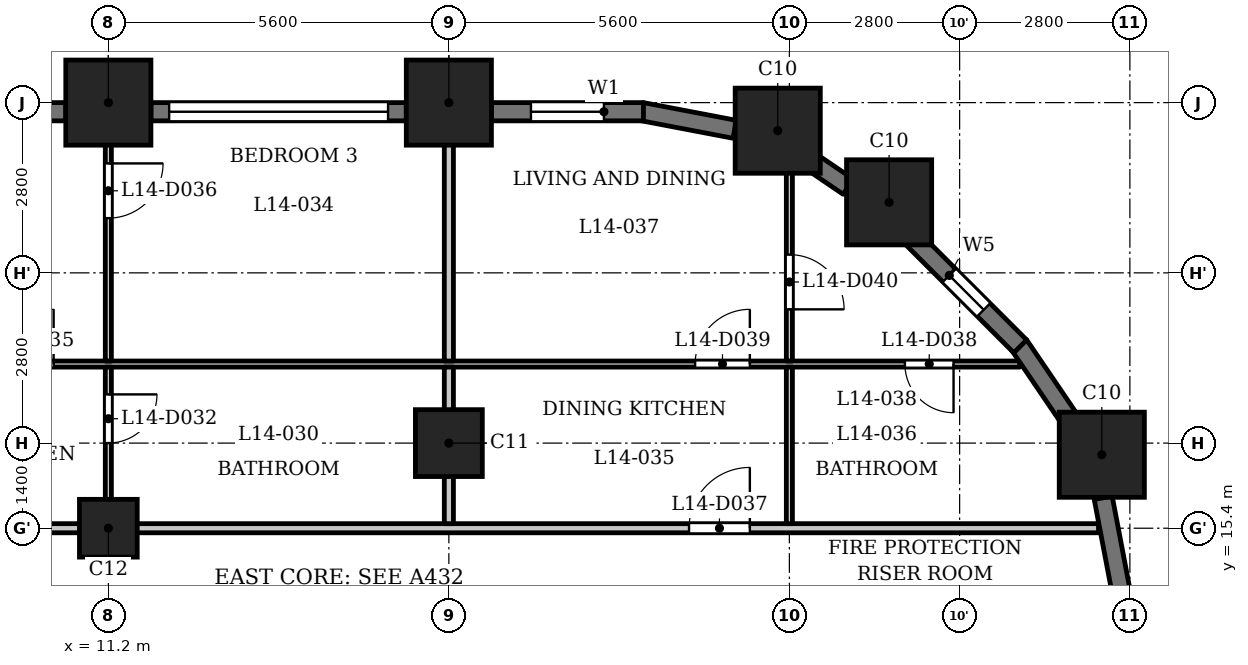
"""IFC4 building model, lengths in metres.
Left out: names, types, materials, properties, quantities, classifications, styles, units other than length and angle.
Written with IfcOpenShell. Run it as: python <this file> out.ifc"""

import sys

from ifc_helpers import new_model, si_unit, direction, frame, frame_2d, origin, origin_2d, place, context, subcontext, project, spatial, rectangle, extrude, element, fill, save


model = new_model("IFC4")
c1 = context("Model", 3, precision=1e-05, world=origin(), true_north=direction((0.0, 1.0)))
c2 = subcontext(c1, "Body", "Model", "MODEL_VIEW")
j1 = project(units=[si_unit("LENGTHUNIT", "METRE"), si_unit("PLANEANGLEUNIT", "RADIAN")], contexts=[c1])
p1 = place(None, origin())
s1 = spatial("IfcSite", under=j1, at=p1, CompositionType="ELEMENT")
p2 = place(p1, origin())
s2 = spatial("IfcBuilding", under=s1, at=p2, CompositionType="ELEMENT")
p3 = place(p2, frame((0.0, 0.0, 58.5)))
s3 = spatial("IfcBuildingStorey", under=s2, at=p3, CompositionType="ELEMENT", Elevation=58.5)
for number, where, z_axis, x_axis in (
    (1, (27.538, 16.609, 0.0), (0.0, 0.0, 1.0), (1.0, 0.0, 0.0)),
    (2, (24.04, 20.76, 0.0), (0.0, 0.0, 1.0), (1.0, 0.0, 0.0)),
    (3, (22.209, 21.938, 0.0), (0.0, 0.0, 1.0), (1.0, 0.0, 0.0)),
    (4, (16.8, 22.4, 0.0), (0.0, 0.0, 1.0), (1.0, 0.0, 0.0)),
    (5, (11.2, 22.4, 0.0), (0.0, 0.0, 1.0), (1.0, 0.0, 0.0)),
):
    element("IfcColumn", number, at=place(p3, frame(where, z_axis=z_axis, x_axis=x_axis)), inside=s3, PredefinedType="COLUMN", context=c2, shape_type="SweptSolid", body=[
        extrude(rectangle(XDim=1.4, YDim=1.4, at=origin_2d()), origin(), (0.0, 0.0, 1.0), 3.5),
    ])
p4 = place(p3, frame((16.8, 16.8, 0.0), z_axis=(0.0, 0.0, 1.0), x_axis=(1.0, 0.0, 0.0)))
e6 = element("IfcColumn", 6, at=p4, inside=s3, PredefinedType="COLUMN", context=c2, shape_type="SweptSolid", body=[
    extrude(rectangle(XDim=1.1, YDim=1.1, at=origin_2d()), origin(), (0.0, 0.0, 1.0), 3.5),
])
p5 = place(p3, frame((11.2, 15.4, 0.0), z_axis=(0.0, 0.0, 1.0), x_axis=(1.0, 0.0, 0.0)))
e7 = element("IfcColumn", 7, at=p5, inside=s3, PredefinedType="COLUMN", context=c2, shape_type="SweptSolid", body=[
    extrude(rectangle(XDim=0.95, YDim=0.95, at=origin_2d()), origin(), (0.0, 0.0, 1.0), 3.5),
])
for number, where, z_axis, x_axis in (
    (8, (27.853, 14.372, 0.0), (0.0, 0.0, 1.0), (-0.187, 0.982, 0.0)),
    (9, (27.053, 17.126, 0.0), (0.0, 0.0, 1.0), (-0.562, 0.827, 0.0)),
):
    element("IfcWall", number, at=place(p3, frame(where, z_axis=z_axis, x_axis=x_axis)), inside=s3, PredefinedType="SOLIDWALL", context=c2, shape_type="SweptSolid", body=[
        extrude(rectangle(XDim=1.556, YDim=0.3, at=frame_2d((0.778, 0.0))), origin(), (0.0, 0.0, 1.0), 2.35),
    ])
p6 = place(p3, frame((26.197, 18.391, 0.0), z_axis=(0.0, 0.0, 1.0), x_axis=(-0.707057949532, 0.707155609469, 0.0)))
e10 = element("IfcWall", 10, at=p6, inside=s3, PredefinedType="SOLIDWALL", context=c2, shape_type="SweptSolid", body=[
    extrude(rectangle(XDim=2.5, YDim=0.3, at=frame_2d((1.25, 0.0))), origin(), (0.0, 0.0, 1.0), 2.35),
])
p7 = place(p6, frame((0.85, 0.0, 0.6)))
e11 = element("IfcOpeningElement", 11, at=p7, cuts=e10, PredefinedType="OPENING", context=c2, shape_type="SweptSolid", body=[
    extrude(rectangle(XDim=0.8, YDim=1.55, at=frame_2d((0.4, 0.775))), frame((0.0, 0.16, 0.0), z_axis=(0.0, -1.0, 0.0), x_axis=(1.0, 0.0, 0.0)), (0.0, 0.0, 1.0), 0.32),
])
p8 = place(p3, frame((23.368, 21.017, 0.0), z_axis=(0.0, 0.0, 1.0), x_axis=(-0.827037530089, 0.562146710232, 0.0)))
e12 = element("IfcWall", 12, at=p8, inside=s3, PredefinedType="SOLIDWALL", context=c2, shape_type="SweptSolid", body=[
    extrude(rectangle(XDim=0.777, YDim=0.3, at=frame_2d((0.388, 0.0))), origin(), (0.0, 0.0, 1.0), 3.2),
])
p9 = place(p3, frame((21.5, 21.961, 0.0), z_axis=(0.0, 0.0, 1.0), x_axis=(-0.982297345734, 0.187328386968, 0.0)))
e13 = element("IfcWall", 13, at=p9, inside=s3, PredefinedType="SOLIDWALL", context=c2, shape_type="SweptSolid", body=[
    extrude(rectangle(XDim=1.556, YDim=0.3, at=frame_2d((0.778, 0.0))), origin(), (0.0, 0.0, 1.0), 2.35),
])
p10 = place(p3, frame((20.0, 22.25, 0.0), z_axis=(0.0, 0.0, 1.0), x_axis=(-1.0, 0.0, 0.0)))
e14 = element("IfcWall", 14, at=p10, inside=s3, PredefinedType="SOLIDWALL", context=c2, shape_type="SweptSolid", body=[
    extrude(rectangle(XDim=2.5, YDim=0.3, at=frame_2d((1.25, 0.0))), origin(), (0.0, 0.0, 1.0), 2.35),
])
p11 = place(p10, frame((0.65, 0.0, 0.6)))
e15 = element("IfcOpeningElement", 15, at=p11, cuts=e14, PredefinedType="OPENING", context=c2, shape_type="SweptSolid", body=[
    extrude(rectangle(XDim=1.2, YDim=1.55, at=frame_2d((0.6, 0.775))), frame((0.0, 0.16, 0.0), z_axis=(0.0, -1.0, 0.0), x_axis=(1.0, 0.0, 0.0)), (0.0, 0.0, 1.0), 0.32),
])
p12 = place(p3, frame((16.1, 22.25, 0.0), z_axis=(0.0, 0.0, 1.0), x_axis=(-1.0, 0.0, 0.0)))
e16 = element("IfcWall", 16, at=p12, inside=s3, PredefinedType="SOLIDWALL", context=c2, shape_type="SweptSolid", body=[
    extrude(rectangle(XDim=4.2, YDim=0.3, at=frame_2d((2.1, 0.0))), origin(), (0.0, 0.0, 1.0), 2.35),
])
p13 = place(p12, frame((0.3, 0.0, 1.2)))
e17 = element("IfcOpeningElement", 17, at=p13, cuts=e16, PredefinedType="OPENING", context=c2, shape_type="SweptSolid", body=[
    extrude(rectangle(XDim=3.6, YDim=0.95, at=frame_2d((1.8, 0.475))), frame((0.0, 0.16, 0.0), z_axis=(0.0, -1.0, 0.0), x_axis=(1.0, 0.0, 0.0)), (0.0, 0.0, 1.0), 0.32),
])
p14 = place(p3, frame((10.5, 22.25, 0.0), z_axis=(0.0, 0.0, 1.0), x_axis=(-1.0, 0.0, 0.0)))
e18 = element("IfcWall", 18, at=p14, inside=s3, PredefinedType="SOLIDWALL", context=c2, shape_type="SweptSolid", body=[
    extrude(rectangle(XDim=4.2, YDim=0.3, at=frame_2d((2.1, 0.0))), origin(), (0.0, 0.0, 1.0), 2.35),
])
p15 = place(p14, frame((0.3, 0.0, 1.2)))
e19 = element("IfcOpeningElement", 19, at=p15, cuts=e18, PredefinedType="OPENING", context=c2, shape_type="SweptSolid", body=[
    extrude(rectangle(XDim=3.6, YDim=0.95, at=frame_2d((1.8, 0.475))), frame((0.0, 0.16, 0.0), z_axis=(0.0, -1.0, 0.0), x_axis=(1.0, 0.0, 0.0)), (0.0, 0.0, 1.0), 0.32),
])
p16 = place(p3, frame((-27.484, 15.4, 0.0), z_axis=(0.0, 0.0, 1.0), x_axis=(1.0, 0.0, 0.0)))
e20 = element("IfcWall", 20, at=p16, inside=s3, PredefinedType="PARTITIONING", context=c2, shape_type="SweptSolid", body=[
    extrude(rectangle(XDim=54.968, YDim=0.15, at=frame_2d((27.484, 0.0))), origin(), (0.0, 0.0, 1.0), 3.2),
])
p17 = place(p16, frame((8.784, 0.0, 0.0)))
e21 = element("IfcOpeningElement", 21, at=p17, cuts=e20, PredefinedType="OPENING", context=c2, shape_type="SweptSolid", body=[
    extrude(rectangle(XDim=1.0, YDim=2.1, at=frame_2d((0.5, 1.05))), frame((0.0, 0.085, 0.0), z_axis=(0.0, -1.0, 0.0), x_axis=(1.0, 0.0, 0.0)), (0.0, 0.0, 1.0), 0.17),
])
p18 = place(p16, frame((12.034, 0.0, 0.0)))
e22 = element("IfcOpeningElement", 22, at=p18, cuts=e20, PredefinedType="OPENING", context=c2, shape_type="SweptSolid", body=[
    extrude(rectangle(XDim=1.0, YDim=2.1, at=frame_2d((0.5, 1.05))), frame((0.0, 0.085, 0.0), z_axis=(0.0, -1.0, 0.0), x_axis=(1.0, 0.0, 0.0)), (0.0, 0.0, 1.0), 0.17),
])
p19 = place(p16, frame((16.984, 0.0, 0.0)))
e23 = element("IfcOpeningElement", 23, at=p19, cuts=e20, PredefinedType="OPENING", context=c2, shape_type="SweptSolid", body=[
    extrude(rectangle(XDim=1.0, YDim=2.1, at=frame_2d((0.5, 1.05))), frame((0.0, 0.085, 0.0), z_axis=(0.0, -1.0, 0.0), x_axis=(1.0, 0.0, 0.0)), (0.0, 0.0, 1.0), 0.17),
])
p20 = place(p16, frame((28.184, 0.0, 0.0)))
e24 = element("IfcOpeningElement", 24, at=p20, cuts=e20, PredefinedType="OPENING", context=c2, shape_type="SweptSolid", body=[
    extrude(rectangle(XDim=1.0, YDim=2.1, at=frame_2d((0.5, 1.05))), frame((0.0, 0.085, 0.0), z_axis=(0.0, -1.0, 0.0), x_axis=(1.0, 0.0, 0.0)), (0.0, 0.0, 1.0), 0.17),
])
p21 = place(p16, frame((48.234, 0.0, 0.0)))
e25 = element("IfcOpeningElement", 25, at=p21, cuts=e20, PredefinedType="OPENING", context=c2, shape_type="SweptSolid", body=[
    extrude(rectangle(XDim=1.0, YDim=2.1, at=frame_2d((0.5, 1.05))), frame((0.0, 0.085, 0.0), z_axis=(0.0, -1.0, 0.0), x_axis=(1.0, 0.0, 0.0)), (0.0, 0.0, 1.0), 0.17),
])
p22 = place(p3, frame((-26.44, 18.1, 0.0), z_axis=(0.0, 0.0, 1.0), x_axis=(1.0, 0.0, 0.0)))
e26 = element("IfcWall", 26, at=p22, inside=s3, PredefinedType="PARTITIONING", context=c2, shape_type="SweptSolid", body=[
    extrude(rectangle(XDim=52.63, YDim=0.1, at=frame_2d((26.315, 0.0))), origin(), (0.0, 0.0, 1.0), 3.2),
])
p23 = place(p22, frame((2.626, 0.0, 0.0)))
e27 = element("IfcOpeningElement", 27, at=p23, cuts=e26, PredefinedType="OPENING", context=c2, shape_type="SweptSolid", body=[
    extrude(rectangle(XDim=0.8, YDim=2.1, at=frame_2d((0.4, 1.05))), frame((0.0, 0.06, 0.0), z_axis=(0.0, -1.0, 0.0), x_axis=(1.0, 0.0, 0.0)), (0.0, 0.0, 1.0), 0.12),
])
p24 = place(p22, frame((7.84, 0.0, 0.0)))
e28 = element("IfcOpeningElement", 28, at=p24, cuts=e26, PredefinedType="OPENING", context=c2, shape_type="SweptSolid", body=[
    extrude(rectangle(XDim=0.9, YDim=2.1, at=frame_2d((0.45, 1.05))), frame((0.0, 0.06, 0.0), z_axis=(0.0, -1.0, 0.0), x_axis=(1.0, 0.0, 0.0)), (0.0, 0.0, 1.0), 0.12),
])
p25 = place(p22, frame((13.79, 0.0, 0.0)))
e29 = element("IfcOpeningElement", 29, at=p25, cuts=e26, PredefinedType="OPENING", context=c2, shape_type="SweptSolid", body=[
    extrude(rectangle(XDim=0.8, YDim=2.1, at=frame_2d((0.4, 1.05))), frame((0.0, 0.06, 0.0), z_axis=(0.0, -1.0, 0.0), x_axis=(1.0, 0.0, 0.0)), (0.0, 0.0, 1.0), 0.12),
])
p26 = place(p22, frame((11.09, 0.0, 0.0)))
e30 = element("IfcOpeningElement", 30, at=p26, cuts=e26, PredefinedType="OPENING", context=c2, shape_type="SweptSolid", body=[
    extrude(rectangle(XDim=0.9, YDim=2.1, at=frame_2d((0.45, 1.05))), frame((0.0, 0.06, 0.0), z_axis=(0.0, -1.0, 0.0), x_axis=(1.0, 0.0, 0.0)), (0.0, 0.0, 1.0), 0.12),
])
p27 = place(p22, frame((21.49, 0.0, 0.0)))
e31 = element("IfcOpeningElement", 31, at=p27, cuts=e26, PredefinedType="OPENING", context=c2, shape_type="SweptSolid", body=[
    extrude(rectangle(XDim=0.8, YDim=2.1, at=frame_2d((0.4, 1.05))), frame((0.0, 0.06, 0.0), z_axis=(0.0, -1.0, 0.0), x_axis=(1.0, 0.0, 0.0)), (0.0, 0.0, 1.0), 0.12),
])
p28 = place(p22, frame((15.79, 0.0, 0.0)))
e32 = element("IfcOpeningElement", 32, at=p28, cuts=e26, PredefinedType="OPENING", context=c2, shape_type="SweptSolid", body=[
    extrude(rectangle(XDim=0.9, YDim=2.1, at=frame_2d((0.45, 1.05))), frame((0.0, 0.06, 0.0), z_axis=(0.0, -1.0, 0.0), x_axis=(1.0, 0.0, 0.0)), (0.0, 0.0, 1.0), 0.12),
])
p29 = place(p22, frame((27.49, 0.0, 0.0)))
e33 = element("IfcOpeningElement", 33, at=p29, cuts=e26, PredefinedType="OPENING", context=c2, shape_type="SweptSolid", body=[
    extrude(rectangle(XDim=0.9, YDim=2.1, at=frame_2d((0.45, 1.05))), frame((0.0, 0.06, 0.0), z_axis=(0.0, -1.0, 0.0), x_axis=(1.0, 0.0, 0.0)), (0.0, 0.0, 1.0), 0.12),
])
p30 = place(p22, frame((29.74, 0.0, 0.0)))
e34 = element("IfcOpeningElement", 34, at=p30, cuts=e26, PredefinedType="OPENING", context=c2, shape_type="SweptSolid", body=[
    extrude(rectangle(XDim=0.9, YDim=2.1, at=frame_2d((0.45, 1.05))), frame((0.0, 0.06, 0.0), z_axis=(0.0, -1.0, 0.0), x_axis=(1.0, 0.0, 0.0)), (0.0, 0.0, 1.0), 0.12),
])
p31 = place(p22, frame((35.84, 0.0, 0.0)))
e35 = element("IfcOpeningElement", 35, at=p31, cuts=e26, PredefinedType="OPENING", context=c2, shape_type="SweptSolid", body=[
    extrude(rectangle(XDim=0.9, YDim=2.1, at=frame_2d((0.45, 1.05))), frame((0.0, 0.06, 0.0), z_axis=(0.0, -1.0, 0.0), x_axis=(1.0, 0.0, 0.0)), (0.0, 0.0, 1.0), 0.12),
])
p32 = place(p22, frame((50.74, 0.0, 0.0)))
e36 = element("IfcOpeningElement", 36, at=p32, cuts=e26, PredefinedType="OPENING", context=c2, shape_type="SweptSolid", body=[
    extrude(rectangle(XDim=0.8, YDim=2.1, at=frame_2d((0.4, 1.05))), frame((0.0, 0.06, 0.0), z_axis=(0.0, -1.0, 0.0), x_axis=(1.0, 0.0, 0.0)), (0.0, 0.0, 1.0), 0.12),
])
p33 = place(p22, frame((47.29, 0.0, 0.0)))
e37 = element("IfcOpeningElement", 37, at=p33, cuts=e26, PredefinedType="OPENING", context=c2, shape_type="SweptSolid", body=[
    extrude(rectangle(XDim=0.9, YDim=2.1, at=frame_2d((0.45, 1.05))), frame((0.0, 0.06, 0.0), z_axis=(0.0, -1.0, 0.0), x_axis=(1.0, 0.0, 0.0)), (0.0, 0.0, 1.0), 0.12),
])
p34 = place(p3, frame((11.2, 15.475, 0.0), z_axis=(0.0, 0.0, 1.0), x_axis=(0.0, 1.0, 0.0)))
e38 = element("IfcWall", 38, at=p34, inside=s3, PredefinedType="PARTITIONING", context=c2, shape_type="SweptSolid", body=[
    extrude(rectangle(XDim=2.575, YDim=0.1, at=frame_2d((1.288, 0.0))), origin(), (0.0, 0.0, 1.0), 3.2),
])
p35 = place(p34, frame((1.326, 0.0, 0.0)))
e39 = element("IfcOpeningElement", 39, at=p35, cuts=e38, PredefinedType="OPENING", context=c2, shape_type="SweptSolid", body=[
    extrude(rectangle(XDim=0.8, YDim=2.1, at=frame_2d((0.4, 1.05))), frame((0.0, 0.06, 0.0), z_axis=(0.0, -1.0, 0.0), x_axis=(1.0, 0.0, 0.0)), (0.0, 0.0, 1.0), 0.12),
])
p36 = place(p3, frame((11.2, 18.15, 0.0), z_axis=(0.0, 0.0, 1.0), x_axis=(0.0, 1.0, 0.0)))
e40 = element("IfcWall", 40, at=p36, inside=s3, PredefinedType="PARTITIONING", context=c2, shape_type="SweptSolid", body=[
    extrude(rectangle(XDim=4.93, YDim=0.1, at=frame_2d((2.465, 0.0))), origin(), (0.0, 0.0, 1.0), 3.2),
])
p37 = place(p36, frame((2.35, 0.0, 0.0)))
e41 = element("IfcOpeningElement", 41, at=p37, cuts=e40, PredefinedType="OPENING", context=c2, shape_type="SweptSolid", body=[
    extrude(rectangle(XDim=0.9, YDim=2.1, at=frame_2d((0.45, 1.05))), frame((0.0, 0.06, 0.0), z_axis=(0.0, -1.0, 0.0), x_axis=(1.0, 0.0, 0.0)), (0.0, 0.0, 1.0), 0.12),
])
p38 = place(p3, frame((16.8, 15.475, 0.0), z_axis=(0.0, 0.0, 1.0), x_axis=(0.0, 1.0, 0.0)))
e42 = element("IfcWall", 42, at=p38, inside=s3, PredefinedType="PARTITIONING", context=c2, shape_type="SweptSolid", body=[
    extrude(rectangle(XDim=2.575, YDim=0.15, at=frame_2d((1.288, 0.0))), origin(), (0.0, 0.0, 1.0), 3.2),
])
p39 = place(p3, frame((16.8, 18.15, 0.0), z_axis=(0.0, 0.0, 1.0), x_axis=(0.0, 1.0, 0.0)))
e43 = element("IfcWall", 43, at=p39, inside=s3, PredefinedType="PARTITIONING", context=c2, shape_type="SweptSolid", body=[
    extrude(rectangle(XDim=4.93, YDim=0.15, at=frame_2d((2.465, 0.0))), origin(), (0.0, 0.0, 1.0), 3.2),
])
p40 = place(p3, frame((22.4, 15.475, 0.0), z_axis=(0.0, 0.0, 1.0), x_axis=(0.0, 1.0, 0.0)))
e44 = element("IfcWall", 44, at=p40, inside=s3, PredefinedType="PARTITIONING", context=c2, shape_type="SweptSolid", body=[
    extrude(rectangle(XDim=2.575, YDim=0.1, at=frame_2d((1.288, 0.0))), origin(), (0.0, 0.0, 1.0), 3.2),
])
p41 = place(p3, frame((22.4, 18.15, 0.0), z_axis=(0.0, 0.0, 1.0), x_axis=(0.0, 1.0, 0.0)))
e45 = element("IfcWall", 45, at=p41, inside=s3, PredefinedType="PARTITIONING", context=c2, shape_type="SweptSolid", body=[
    extrude(rectangle(XDim=3.57, YDim=0.1, at=frame_2d((1.785, 0.0))), origin(), (0.0, 0.0, 1.0), 3.2),
])
p42 = place(p41, frame((0.85, 0.0, 0.0)))
e46 = element("IfcOpeningElement", 46, at=p42, cuts=e45, PredefinedType="OPENING", context=c2, shape_type="SweptSolid", body=[
    extrude(rectangle(XDim=0.9, YDim=2.1, at=frame_2d((0.45, 1.05))), frame((0.0, 0.06, 0.0), z_axis=(0.0, -1.0, 0.0), x_axis=(1.0, 0.0, 0.0)), (0.0, 0.0, 1.0), 0.12),
])
p43 = place(p35, origin())
e47 = element("IfcDoor", 47, at=p43, inside=s3, OperationType="SINGLE_SWING_RIGHT", PredefinedType="DOOR", context=c2, shape_type="SweptSolid", body=[
    extrude(rectangle(XDim=0.8, YDim=2.1, at=frame_2d((0.4, 1.05))), frame((0.0, 0.025, 0.0), z_axis=(0.0, -1.0, 0.0), x_axis=(1.0, 0.0, 0.0)), (0.0, 0.0, 1.0), 0.05),
])
fill(e39, e47)
p44 = place(p31, origin())
e48 = element("IfcDoor", 48, at=p44, inside=s3, OperationType="SINGLE_SWING_LEFT", PredefinedType="DOOR", context=c2, shape_type="SweptSolid", body=[
    extrude(rectangle(XDim=0.9, YDim=2.1, at=frame_2d((0.45, 1.05))), frame((0.0, 0.025, 0.0), z_axis=(0.0, -1.0, 0.0), x_axis=(1.0, 0.0, 0.0)), (0.0, 0.0, 1.0), 0.05),
])
fill(e35, e48)
p45 = place(p37, origin())
e49 = element("IfcDoor", 49, at=p45, inside=s3, OperationType="SINGLE_SWING_RIGHT", PredefinedType="DOOR", context=c2, shape_type="SweptSolid", body=[
    extrude(rectangle(XDim=0.9, YDim=2.1, at=frame_2d((0.45, 1.05))), frame((0.0, 0.025, 0.0), z_axis=(0.0, -1.0, 0.0), x_axis=(1.0, 0.0, 0.0)), (0.0, 0.0, 1.0), 0.05),
])
fill(e41, e49)
p46 = place(p21, origin())
e50 = element("IfcDoor", 50, at=p46, inside=s3, OperationType="SINGLE_SWING_LEFT", PredefinedType="DOOR", context=c2, shape_type="SweptSolid", body=[
    extrude(rectangle(XDim=1.0, YDim=2.1, at=frame_2d((0.5, 1.05))), frame((0.0, 0.025, 0.0), z_axis=(0.0, -1.0, 0.0), x_axis=(1.0, 0.0, 0.0)), (0.0, 0.0, 1.0), 0.05),
])
fill(e25, e50)
p47 = place(p32, origin())
e51 = element("IfcDoor", 51, at=p47, inside=s3, OperationType="SINGLE_SWING_RIGHT", PredefinedType="DOOR", context=c2, shape_type="SweptSolid", body=[
    extrude(rectangle(XDim=0.8, YDim=2.1, at=frame_2d((0.4, 1.05))), frame((0.0, 0.025, 0.0), z_axis=(0.0, -1.0, 0.0), x_axis=(1.0, 0.0, 0.0)), (0.0, 0.0, 1.0), 0.05),
])
fill(e36, e51)
p48 = place(p33, origin())
e52 = element("IfcDoor", 52, at=p48, inside=s3, OperationType="SINGLE_SWING_LEFT", PredefinedType="DOOR", context=c2, shape_type="SweptSolid", body=[
    extrude(rectangle(XDim=0.9, YDim=2.1, at=frame_2d((0.45, 1.05))), frame((0.0, 0.025, 0.0), z_axis=(0.0, -1.0, 0.0), x_axis=(1.0, 0.0, 0.0)), (0.0, 0.0, 1.0), 0.05),
])
fill(e37, e52)
p49 = place(p42, origin())
e53 = element("IfcDoor", 53, at=p49, inside=s3, OperationType="SINGLE_SWING_LEFT", PredefinedType="DOOR", context=c2, shape_type="SweptSolid", body=[
    extrude(rectangle(XDim=0.9, YDim=2.1, at=frame_2d((0.45, 1.05))), frame((0.0, 0.025, 0.0), z_axis=(0.0, -1.0, 0.0), x_axis=(1.0, 0.0, 0.0)), (0.0, 0.0, 1.0), 0.05),
])
fill(e46, e53)
p50 = place(p7, origin())
e54 = element("IfcWindow", 54, at=p50, inside=s3, PartitioningType="SINGLE_PANEL", PredefinedType="WINDOW", context=c2, shape_type="SweptSolid", body=[
    extrude(rectangle(XDim=0.8, YDim=1.55, at=frame_2d((0.4, 0.775))), frame((0.0, 0.03, 0.0), z_axis=(0.0, -1.0, 0.0), x_axis=(1.0, 0.0, 0.0)), (0.0, 0.0, 1.0), 0.06),
])
fill(e11, e54)
p51 = place(p11, origin())
e55 = element("IfcWindow", 55, at=p51, inside=s3, PartitioningType="SINGLE_PANEL", PredefinedType="WINDOW", context=c2, shape_type="SweptSolid", body=[
    extrude(rectangle(XDim=1.2, YDim=1.55, at=frame_2d((0.6, 0.775))), frame((0.0, 0.03, 0.0), z_axis=(0.0, -1.0, 0.0), x_axis=(1.0, 0.0, 0.0)), (0.0, 0.0, 1.0), 0.06),
])
fill(e15, e55)
p52 = place(p13, origin())
e56 = element("IfcWindow", 56, at=p52, inside=s3, PartitioningType="SINGLE_PANEL", PredefinedType="WINDOW", context=c2, shape_type="SweptSolid", body=[
    extrude(rectangle(XDim=3.6, YDim=0.95, at=frame_2d((1.8, 0.475))), frame((0.0, 0.03, 0.0), z_axis=(0.0, -1.0, 0.0), x_axis=(1.0, 0.0, 0.0)), (0.0, 0.0, 1.0), 0.06),
])
fill(e17, e56)
save(model, sys.argv[1])
